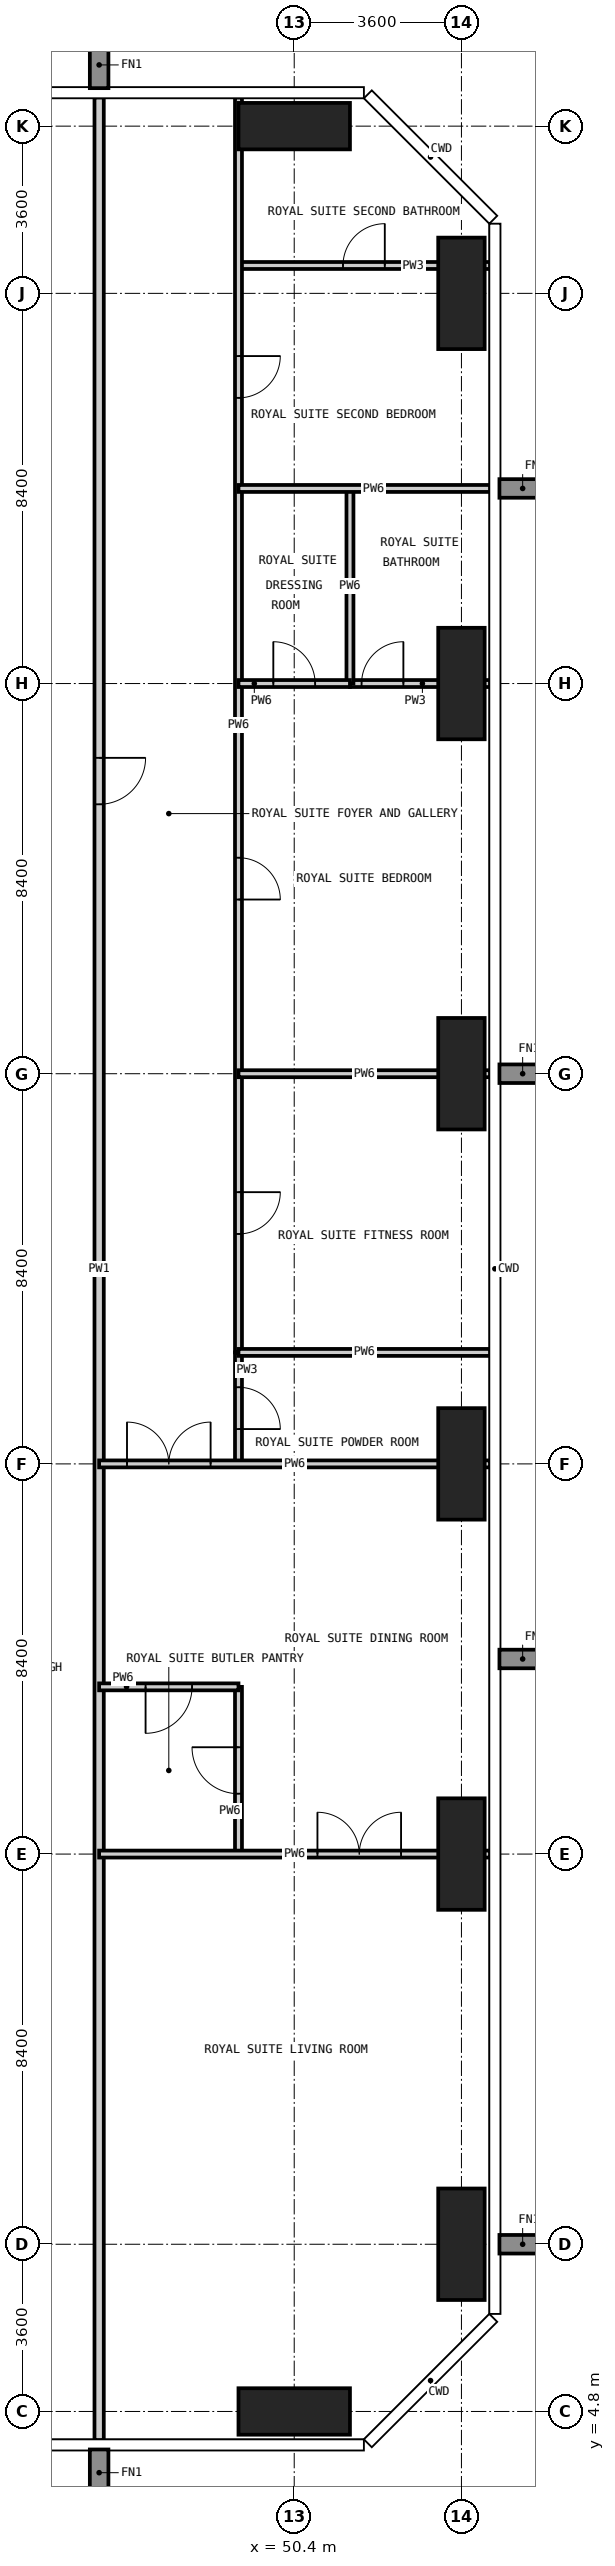
"""IFC4 building model, lengths in metres.
Left out: names, types, materials, properties, quantities, classifications, styles, units other than length and angle.
Written with IfcOpenShell. Run it as: python <this file> out.ifc"""

import sys

from ifc_helpers import new_model, si_unit, direction, frame, frame_2d, origin, origin_2d, place, context, subcontext, project, spatial, rectangle, extrude, element, fill, save


model = new_model("IFC4")
c1 = context("Model", 3, precision=1e-05, world=origin(), true_north=direction((0.0, 1.0)))
c2 = subcontext(c1, "Body", "Model", "MODEL_VIEW")
j1 = project(units=[si_unit("LENGTHUNIT", "METRE"), si_unit("PLANEANGLEUNIT", "RADIAN")], contexts=[c1])
p1 = place(None, origin())
s1 = spatial("IfcSite", under=j1, at=p1, CompositionType="ELEMENT")
p2 = place(p1, origin())
s2 = spatial("IfcBuilding", under=s1, at=p2, CompositionType="ELEMENT")
p3 = place(p2, frame((0.0, 0.0, 289.1)))
s3 = spatial("IfcBuildingStorey", under=s2, at=p3, CompositionType="ELEMENT", Elevation=289.1)
for number, where, z_axis, x_axis in (
    (1, (50.4, 4.8, -0.35), (0.0, 0.0, 1.0), (1.0, 0.0, 0.0)),
    (2, (50.4, 54.0, -0.35), (0.0, 0.0, 1.0), (1.0, 0.0, 0.0)),
):
    element("IfcColumn", number, at=place(p3, frame(where, z_axis=z_axis, x_axis=x_axis)), inside=s3, PredefinedType="COLUMN", context=c2, shape_type="SweptSolid", body=[
        extrude(rectangle(XDim=2.4, YDim=1.0, at=origin_2d()), origin(), (0.0, 0.0, 1.0), 4.5),
    ])
for number, where, z_axis, x_axis in (
    (3, (54.0, 8.4, -0.35), (0.0, 0.0, 1.0), (1.0, 0.0, 0.0)),
    (4, (54.0, 16.8, -0.35), (0.0, 0.0, 1.0), (1.0, 0.0, 0.0)),
    (5, (54.0, 25.2, -0.35), (0.0, 0.0, 1.0), (1.0, 0.0, 0.0)),
    (6, (54.0, 33.6, -0.35), (0.0, 0.0, 1.0), (1.0, 0.0, 0.0)),
    (7, (54.0, 42.0, -0.35), (0.0, 0.0, 1.0), (1.0, 0.0, 0.0)),
    (8, (54.0, 50.4, -0.35), (0.0, 0.0, 1.0), (1.0, 0.0, 0.0)),
):
    element("IfcColumn", number, at=place(p3, frame(where, z_axis=z_axis, x_axis=x_axis)), inside=s3, PredefinedType="COLUMN", context=c2, shape_type="SweptSolid", body=[
        extrude(rectangle(XDim=1.0, YDim=2.4, at=origin_2d()), origin(), (0.0, 0.0, 1.0), 4.5),
    ])
p4 = place(p3, frame((49.2, 25.2, 0.0), z_axis=(0.0, 0.0, 1.0), x_axis=(0.0, 1.0, 0.0)))
e9 = element("IfcWall", 9, at=p4, inside=s3, PredefinedType="PARTITIONING", context=c2, shape_type="SweptSolid", body=[
    extrude(rectangle(XDim=2.4, YDim=0.15, at=frame_2d((1.2, 0.0))), origin(), (0.0, 0.0, 1.0), 4.15),
])
p5 = place(p4, frame((0.75, 0.0, 0.0)))
e10 = element("IfcOpeningElement", 10, at=p5, cuts=e9, PredefinedType="OPENING", context=c2, shape_type="SweptSolid", body=[
    extrude(rectangle(XDim=0.9, YDim=2.1, at=frame_2d((0.45, 1.05))), frame((0.0, 0.085, 0.0), z_axis=(0.0, -1.0, 0.0), x_axis=(1.0, 0.0, 0.0)), (0.0, 0.0, 1.0), 0.17),
])
p6 = place(p3, frame((51.6, 42.0, 0.0), z_axis=(0.0, 0.0, 1.0), x_axis=(1.0, 0.0, 0.0)))
e11 = element("IfcWall", 11, at=p6, inside=s3, PredefinedType="PARTITIONING", context=c2, shape_type="SweptSolid", body=[
    extrude(rectangle(XDim=3.018, YDim=0.15, at=frame_2d((1.509, 0.0))), origin(), (0.0, 0.0, 1.0), 4.15),
])
p7 = place(p6, frame((0.25, 0.0, 0.0)))
e12 = element("IfcOpeningElement", 12, at=p7, cuts=e11, PredefinedType="OPENING", context=c2, shape_type="SweptSolid", body=[
    extrude(rectangle(XDim=0.9, YDim=2.1, at=frame_2d((0.45, 1.05))), frame((0.0, 0.085, 0.0), z_axis=(0.0, -1.0, 0.0), x_axis=(1.0, 0.0, 0.0)), (0.0, 0.0, 1.0), 0.17),
])
p8 = place(p3, frame((49.2, 51.0, 0.0), z_axis=(0.0, 0.0, 1.0), x_axis=(1.0, 0.0, 0.0)))
e13 = element("IfcWall", 13, at=p8, inside=s3, PredefinedType="PARTITIONING", context=c2, shape_type="SweptSolid", body=[
    extrude(rectangle(XDim=5.418, YDim=0.15, at=frame_2d((2.709, 0.0))), origin(), (0.0, 0.0, 1.0), 4.15),
])
p9 = place(p8, frame((2.25, 0.0, 0.0)))
e14 = element("IfcOpeningElement", 14, at=p9, cuts=e13, PredefinedType="OPENING", context=c2, shape_type="SweptSolid", body=[
    extrude(rectangle(XDim=0.9, YDim=2.1, at=frame_2d((0.45, 1.05))), frame((0.0, 0.085, 0.0), z_axis=(0.0, -1.0, 0.0), x_axis=(1.0, 0.0, 0.0)), (0.0, 0.0, 1.0), 0.17),
])
p10 = place(p3, frame((46.2, 54.618, 0.0), z_axis=(0.0, 0.0, 1.0), x_axis=(0.0, -1.0, 0.0)))
e15 = element("IfcWall", 15, at=p10, inside=s3, PredefinedType="PARTITIONING", context=c2, shape_type="SweptSolid", body=[
    extrude(rectangle(XDim=50.436, YDim=0.2, at=frame_2d((25.218, 0.0))), origin(), (0.0, 0.0, 1.0), 4.15),
])
p11 = place(p10, frame((14.218, 0.0, 0.0)))
e16 = element("IfcOpeningElement", 16, at=p11, cuts=e15, PredefinedType="OPENING", context=c2, shape_type="SweptSolid", body=[
    extrude(rectangle(XDim=1.0, YDim=2.2, at=frame_2d((0.5, 1.1))), frame((0.0, 0.11, 0.0), z_axis=(0.0, -1.0, 0.0), x_axis=(1.0, 0.0, 0.0)), (0.0, 0.0, 1.0), 0.22),
])
p12 = place(p3, frame((49.2, 16.8, 0.0), z_axis=(0.0, 0.0, 1.0), x_axis=(0.0, 1.0, 0.0)))
e17 = element("IfcWall", 17, at=p12, inside=s3, PredefinedType="PARTITIONING", context=c2, shape_type="SweptSolid", body=[
    extrude(rectangle(XDim=3.6, YDim=0.15, at=frame_2d((1.8, 0.0))), origin(), (0.0, 0.0, 1.0), 4.15),
])
p13 = place(p12, frame((1.3, 0.0, 0.0)))
e18 = element("IfcOpeningElement", 18, at=p13, cuts=e17, PredefinedType="OPENING", context=c2, shape_type="SweptSolid", body=[
    extrude(rectangle(XDim=1.0, YDim=2.1, at=frame_2d((0.5, 1.05))), frame((0.0, 0.085, 0.0), z_axis=(0.0, -1.0, 0.0), x_axis=(1.0, 0.0, 0.0)), (0.0, 0.0, 1.0), 0.17),
])
p14 = place(p3, frame((49.2, 27.6, 0.0), z_axis=(0.0, 0.0, 1.0), x_axis=(0.0, 1.0, 0.0)))
e19 = element("IfcWall", 19, at=p14, inside=s3, PredefinedType="PARTITIONING", context=c2, shape_type="SweptSolid", body=[
    extrude(rectangle(XDim=27.018, YDim=0.15, at=frame_2d((13.509, 0.0))), origin(), (0.0, 0.0, 1.0), 4.15),
])
p15 = place(p14, frame((2.55, 0.0, 0.0)))
e20 = element("IfcOpeningElement", 20, at=p15, cuts=e19, PredefinedType="OPENING", context=c2, shape_type="SweptSolid", body=[
    extrude(rectangle(XDim=0.9, YDim=2.1, at=frame_2d((0.45, 1.05))), frame((0.0, 0.085, 0.0), z_axis=(0.0, -1.0, 0.0), x_axis=(1.0, 0.0, 0.0)), (0.0, 0.0, 1.0), 0.17),
])
p16 = place(p14, frame((9.75, 0.0, 0.0)))
e21 = element("IfcOpeningElement", 21, at=p16, cuts=e19, PredefinedType="OPENING", context=c2, shape_type="SweptSolid", body=[
    extrude(rectangle(XDim=0.9, YDim=2.1, at=frame_2d((0.45, 1.05))), frame((0.0, 0.085, 0.0), z_axis=(0.0, -1.0, 0.0), x_axis=(1.0, 0.0, 0.0)), (0.0, 0.0, 1.0), 0.17),
])
p17 = place(p14, frame((20.55, 0.0, 0.0)))
e22 = element("IfcOpeningElement", 22, at=p17, cuts=e19, PredefinedType="OPENING", context=c2, shape_type="SweptSolid", body=[
    extrude(rectangle(XDim=0.9, YDim=2.1, at=frame_2d((0.45, 1.05))), frame((0.0, 0.085, 0.0), z_axis=(0.0, -1.0, 0.0), x_axis=(1.0, 0.0, 0.0)), (0.0, 0.0, 1.0), 0.17),
])
p18 = place(p3, frame((51.6, 42.0, 0.0), z_axis=(0.0, 0.0, 1.0), x_axis=(0.0, 1.0, 0.0)))
e23 = element("IfcWall", 23, at=p18, inside=s3, PredefinedType="PARTITIONING", context=c2, shape_type="SweptSolid", body=[
    extrude(rectangle(XDim=4.2, YDim=0.15, at=frame_2d((2.1, 0.0))), origin(), (0.0, 0.0, 1.0), 4.15),
])
p19 = place(p3, frame((46.2, 16.8, 0.0), z_axis=(0.0, 0.0, 1.0), x_axis=(1.0, 0.0, 0.0)))
e24 = element("IfcWall", 24, at=p19, inside=s3, PredefinedType="PARTITIONING", context=c2, shape_type="SweptSolid", body=[
    extrude(rectangle(XDim=8.418, YDim=0.15, at=frame_2d((4.209, 0.0))), origin(), (0.0, 0.0, 1.0), 4.15),
])
p20 = place(p19, frame((4.7, 0.0, 0.0)))
e25 = element("IfcOpeningElement", 25, at=p20, cuts=e24, PredefinedType="OPENING", context=c2, shape_type="SweptSolid", body=[
    extrude(rectangle(XDim=1.8, YDim=2.4, at=frame_2d((0.9, 1.2))), frame((0.0, 0.085, 0.0), z_axis=(0.0, -1.0, 0.0), x_axis=(1.0, 0.0, 0.0)), (0.0, 0.0, 1.0), 0.17),
])
p21 = place(p3, frame((46.2, 20.4, 0.0), z_axis=(0.0, 0.0, 1.0), x_axis=(1.0, 0.0, 0.0)))
e26 = element("IfcWall", 26, at=p21, inside=s3, PredefinedType="PARTITIONING", context=c2, shape_type="SweptSolid", body=[
    extrude(rectangle(XDim=3.0, YDim=0.15, at=frame_2d((1.5, 0.0))), origin(), (0.0, 0.0, 1.0), 4.15),
])
p22 = place(p21, frame((1.0, 0.0, 0.0)))
e27 = element("IfcOpeningElement", 27, at=p22, cuts=e26, PredefinedType="OPENING", context=c2, shape_type="SweptSolid", body=[
    extrude(rectangle(XDim=1.0, YDim=2.1, at=frame_2d((0.5, 1.05))), frame((0.0, 0.085, 0.0), z_axis=(0.0, -1.0, 0.0), x_axis=(1.0, 0.0, 0.0)), (0.0, 0.0, 1.0), 0.17),
])
p23 = place(p3, frame((46.2, 25.2, 0.0), z_axis=(0.0, 0.0, 1.0), x_axis=(1.0, 0.0, 0.0)))
e28 = element("IfcWall", 28, at=p23, inside=s3, PredefinedType="PARTITIONING", context=c2, shape_type="SweptSolid", body=[
    extrude(rectangle(XDim=8.418, YDim=0.15, at=frame_2d((4.209, 0.0))), origin(), (0.0, 0.0, 1.0), 4.15),
])
p24 = place(p23, frame((0.6, 0.0, 0.0)))
e29 = element("IfcOpeningElement", 29, at=p24, cuts=e28, PredefinedType="OPENING", context=c2, shape_type="SweptSolid", body=[
    extrude(rectangle(XDim=1.8, YDim=2.4, at=frame_2d((0.9, 1.2))), frame((0.0, 0.085, 0.0), z_axis=(0.0, -1.0, 0.0), x_axis=(1.0, 0.0, 0.0)), (0.0, 0.0, 1.0), 0.17),
])
for number, where, z_axis, x_axis in (
    (30, (49.2, 27.6, 0.0), (0.0, 0.0, 1.0), (1.0, 0.0, 0.0)),
    (31, (49.2, 33.6, 0.0), (0.0, 0.0, 1.0), (1.0, 0.0, 0.0)),
):
    element("IfcWall", number, at=place(p3, frame(where, z_axis=z_axis, x_axis=x_axis)), inside=s3, PredefinedType="PARTITIONING", context=c2, shape_type="SweptSolid", body=[
        extrude(rectangle(XDim=5.418, YDim=0.15, at=frame_2d((2.709, 0.0))), origin(), (0.0, 0.0, 1.0), 4.15),
    ])
p25 = place(p3, frame((49.2, 42.0, 0.0), z_axis=(0.0, 0.0, 1.0), x_axis=(1.0, 0.0, 0.0)))
e32 = element("IfcWall", 32, at=p25, inside=s3, PredefinedType="PARTITIONING", context=c2, shape_type="SweptSolid", body=[
    extrude(rectangle(XDim=2.4, YDim=0.15, at=frame_2d((1.2, 0.0))), origin(), (0.0, 0.0, 1.0), 4.15),
])
p26 = place(p25, frame((0.75, 0.0, 0.0)))
e33 = element("IfcOpeningElement", 33, at=p26, cuts=e32, PredefinedType="OPENING", context=c2, shape_type="SweptSolid", body=[
    extrude(rectangle(XDim=0.9, YDim=2.1, at=frame_2d((0.45, 1.05))), frame((0.0, 0.085, 0.0), z_axis=(0.0, -1.0, 0.0), x_axis=(1.0, 0.0, 0.0)), (0.0, 0.0, 1.0), 0.17),
])
p27 = place(p3, frame((49.2, 46.2, 0.0), z_axis=(0.0, 0.0, 1.0), x_axis=(1.0, 0.0, 0.0)))
e34 = element("IfcWall", 34, at=p27, inside=s3, PredefinedType="PARTITIONING", context=c2, shape_type="SweptSolid", body=[
    extrude(rectangle(XDim=5.418, YDim=0.15, at=frame_2d((2.709, 0.0))), origin(), (0.0, 0.0, 1.0), 4.15),
])
p28 = place(p11, origin())
e35 = element("IfcDoor", 35, at=p28, inside=s3, OperationType="SINGLE_SWING_LEFT", PredefinedType="DOOR", context=c2, shape_type="SweptSolid", body=[
    extrude(rectangle(XDim=1.0, YDim=2.2, at=frame_2d((0.5, 1.1))), frame((0.0, 0.025, 0.0), z_axis=(0.0, -1.0, 0.0), x_axis=(1.0, 0.0, 0.0)), (0.0, 0.0, 1.0), 0.05),
])
fill(e16, e35)
p29 = place(p20, origin())
e36 = element("IfcDoor", 36, at=p29, inside=s3, OperationType="DOUBLE_DOOR_DOUBLE_SWING", PredefinedType="DOOR", context=c2, shape_type="SweptSolid", body=[
    extrude(rectangle(XDim=1.8, YDim=2.4, at=frame_2d((0.9, 1.2))), frame((0.0, 0.025, 0.0), z_axis=(0.0, -1.0, 0.0), x_axis=(1.0, 0.0, 0.0)), (0.0, 0.0, 1.0), 0.05),
])
fill(e25, e36)
p30 = place(p13, origin())
e37 = element("IfcDoor", 37, at=p30, inside=s3, OperationType="SINGLE_SWING_RIGHT", PredefinedType="DOOR", context=c2, shape_type="SweptSolid", body=[
    extrude(rectangle(XDim=1.0, YDim=2.1, at=frame_2d((0.5, 1.05))), frame((0.0, 0.025, 0.0), z_axis=(0.0, -1.0, 0.0), x_axis=(1.0, 0.0, 0.0)), (0.0, 0.0, 1.0), 0.05),
])
fill(e18, e37)
p31 = place(p22, frame((1.0, 0.0, 0.0), z_axis=(0.0, 0.0, 1.0), x_axis=(-1.0, 0.0, 0.0)))
e38 = element("IfcDoor", 38, at=p31, inside=s3, OperationType="SINGLE_SWING_RIGHT", PredefinedType="DOOR", context=c2, shape_type="SweptSolid", body=[
    extrude(rectangle(XDim=1.0, YDim=2.1, at=frame_2d((0.5, 1.05))), frame((0.0, 0.025, 0.0), z_axis=(0.0, -1.0, 0.0), x_axis=(1.0, 0.0, 0.0)), (0.0, 0.0, 1.0), 0.05),
])
fill(e27, e38)
p32 = place(p24, origin())
e39 = element("IfcDoor", 39, at=p32, inside=s3, OperationType="DOUBLE_DOOR_DOUBLE_SWING", PredefinedType="DOOR", context=c2, shape_type="SweptSolid", body=[
    extrude(rectangle(XDim=1.8, YDim=2.4, at=frame_2d((0.9, 1.2))), frame((0.0, 0.025, 0.0), z_axis=(0.0, -1.0, 0.0), x_axis=(1.0, 0.0, 0.0)), (0.0, 0.0, 1.0), 0.05),
])
fill(e29, e39)
p33 = place(p5, frame((0.9, 0.0, 0.0), z_axis=(0.0, 0.0, 1.0), x_axis=(-1.0, 0.0, 0.0)))
e40 = element("IfcDoor", 40, at=p33, inside=s3, OperationType="SINGLE_SWING_RIGHT", PredefinedType="DOOR", context=c2, shape_type="SweptSolid", body=[
    extrude(rectangle(XDim=0.9, YDim=2.1, at=frame_2d((0.45, 1.05))), frame((0.0, 0.025, 0.0), z_axis=(0.0, -1.0, 0.0), x_axis=(1.0, 0.0, 0.0)), (0.0, 0.0, 1.0), 0.05),
])
fill(e10, e40)
p34 = place(p15, frame((0.9, 0.0, 0.0), z_axis=(0.0, 0.0, 1.0), x_axis=(-1.0, 0.0, 0.0)))
e41 = element("IfcDoor", 41, at=p34, inside=s3, OperationType="SINGLE_SWING_LEFT", PredefinedType="DOOR", context=c2, shape_type="SweptSolid", body=[
    extrude(rectangle(XDim=0.9, YDim=2.1, at=frame_2d((0.45, 1.05))), frame((0.0, 0.025, 0.0), z_axis=(0.0, -1.0, 0.0), x_axis=(1.0, 0.0, 0.0)), (0.0, 0.0, 1.0), 0.05),
])
fill(e20, e41)
p35 = place(p16, frame((0.9, 0.0, 0.0), z_axis=(0.0, 0.0, 1.0), x_axis=(-1.0, 0.0, 0.0)))
e42 = element("IfcDoor", 42, at=p35, inside=s3, OperationType="SINGLE_SWING_RIGHT", PredefinedType="DOOR", context=c2, shape_type="SweptSolid", body=[
    extrude(rectangle(XDim=0.9, YDim=2.1, at=frame_2d((0.45, 1.05))), frame((0.0, 0.025, 0.0), z_axis=(0.0, -1.0, 0.0), x_axis=(1.0, 0.0, 0.0)), (0.0, 0.0, 1.0), 0.05),
])
fill(e21, e42)
p36 = place(p7, origin())
e43 = element("IfcDoor", 43, at=p36, inside=s3, OperationType="SINGLE_SWING_RIGHT", PredefinedType="DOOR", context=c2, shape_type="SweptSolid", body=[
    extrude(rectangle(XDim=0.9, YDim=2.1, at=frame_2d((0.45, 1.05))), frame((0.0, 0.025, 0.0), z_axis=(0.0, -1.0, 0.0), x_axis=(1.0, 0.0, 0.0)), (0.0, 0.0, 1.0), 0.05),
])
fill(e12, e43)
p37 = place(p26, origin())
e44 = element("IfcDoor", 44, at=p37, inside=s3, OperationType="SINGLE_SWING_LEFT", PredefinedType="DOOR", context=c2, shape_type="SweptSolid", body=[
    extrude(rectangle(XDim=0.9, YDim=2.1, at=frame_2d((0.45, 1.05))), frame((0.0, 0.025, 0.0), z_axis=(0.0, -1.0, 0.0), x_axis=(1.0, 0.0, 0.0)), (0.0, 0.0, 1.0), 0.05),
])
fill(e33, e44)
p38 = place(p17, frame((0.9, 0.0, 0.0), z_axis=(0.0, 0.0, 1.0), x_axis=(-1.0, 0.0, 0.0)))
e45 = element("IfcDoor", 45, at=p38, inside=s3, OperationType="SINGLE_SWING_LEFT", PredefinedType="DOOR", context=c2, shape_type="SweptSolid", body=[
    extrude(rectangle(XDim=0.9, YDim=2.1, at=frame_2d((0.45, 1.05))), frame((0.0, 0.025, 0.0), z_axis=(0.0, -1.0, 0.0), x_axis=(1.0, 0.0, 0.0)), (0.0, 0.0, 1.0), 0.05),
])
fill(e22, e45)
p39 = place(p9, origin())
e46 = element("IfcDoor", 46, at=p39, inside=s3, OperationType="SINGLE_SWING_RIGHT", PredefinedType="DOOR", context=c2, shape_type="SweptSolid", body=[
    extrude(rectangle(XDim=0.9, YDim=2.1, at=frame_2d((0.45, 1.05))), frame((0.0, 0.025, 0.0), z_axis=(0.0, -1.0, 0.0), x_axis=(1.0, 0.0, 0.0)), (0.0, 0.0, 1.0), 0.05),
])
fill(e14, e46)
save(model, sys.argv[1])
